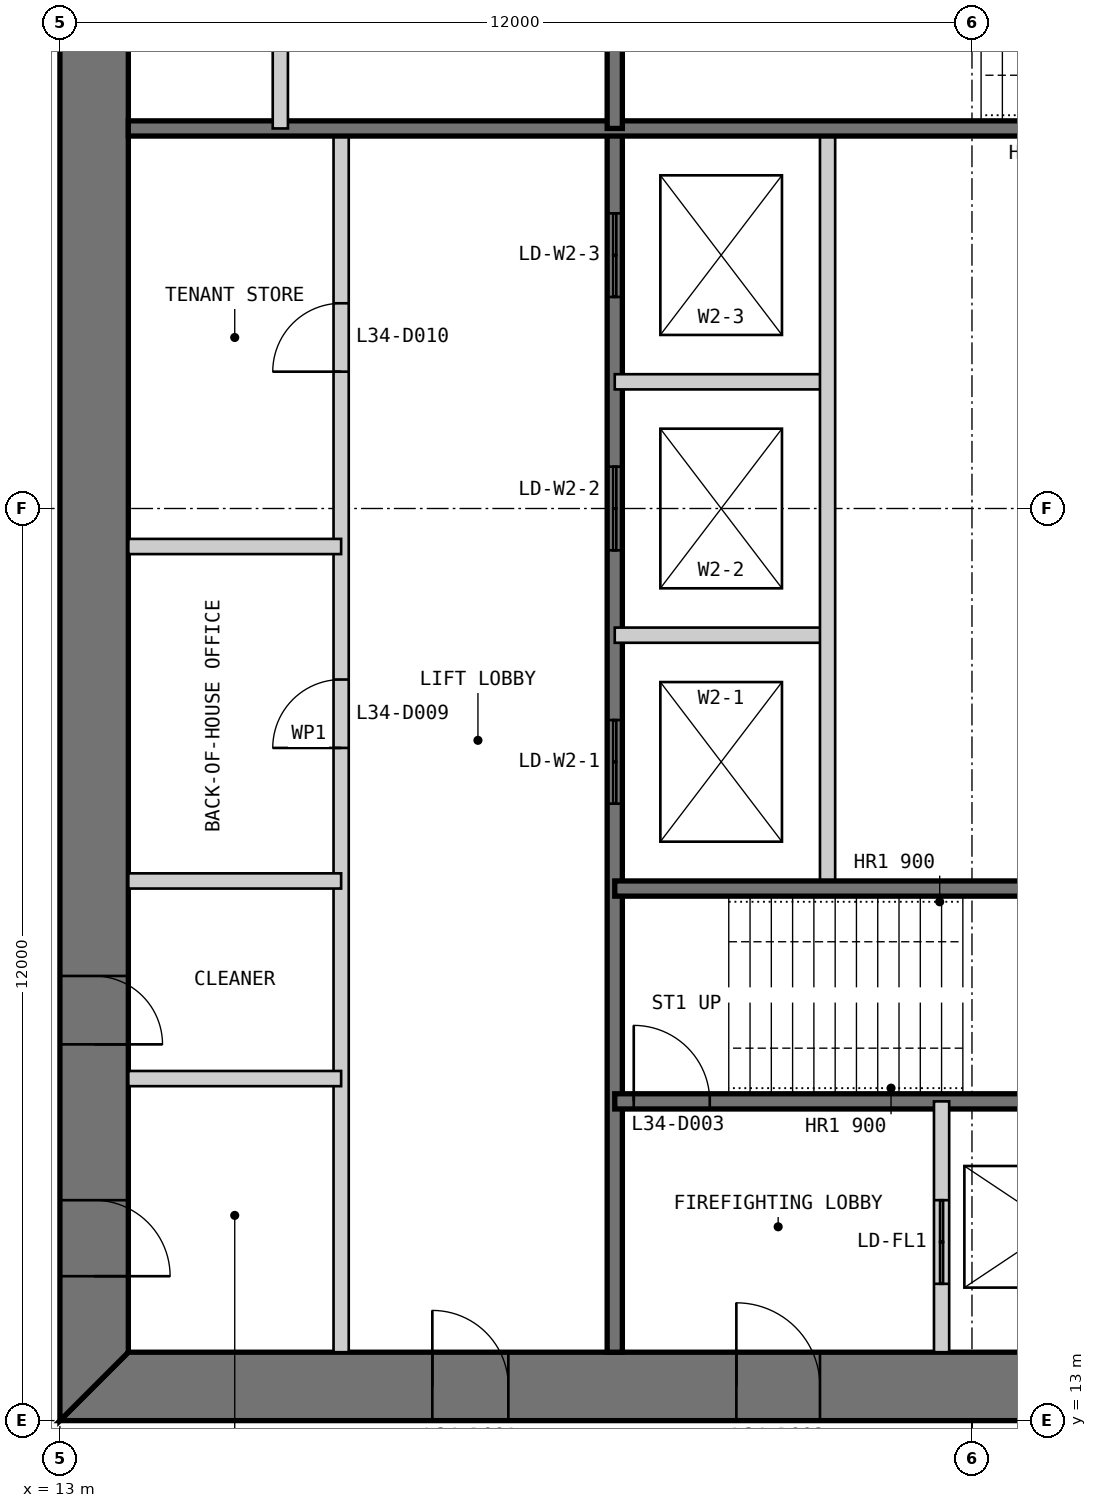
"""IFC4 building model, lengths in metres.
Left out: names, types, materials, properties, quantities, classifications, styles, units other than length and angle.
Written with IfcOpenShell. Run it as: python <this file> out.ifc"""

import sys

from ifc_helpers import new_model, si_unit, direction, frame, frame_2d, origin, place, context, subcontext, project, spatial, polyline, rectangle, outline, extrude, element, fill, save


model = new_model("IFC4")
c1 = context("Model", 3, precision=1e-05, world=origin(), true_north=direction((0.0, 1.0)))
c2 = subcontext(c1, "Body", "Model", "MODEL_VIEW")
j1 = project(units=[si_unit("LENGTHUNIT", "METRE"), si_unit("PLANEANGLEUNIT", "RADIAN")], contexts=[c1])
p1 = place(None, origin())
s1 = spatial("IfcSite", under=j1, at=p1, CompositionType="ELEMENT")
p2 = place(p1, origin())
s2 = spatial("IfcBuilding", under=s1, at=p2, CompositionType="ELEMENT")
p3 = place(p2, frame((0.0, 0.0, 146.4)))
s3 = spatial("IfcBuildingStorey", under=s2, at=p3, CompositionType="ELEMENT", Elevation=146.4)
p4 = place(p3, frame((13.0, 13.45, 0.0), z_axis=(0.0, 0.0, 1.0), x_axis=(1.0, 0.0, 0.0)))
e1 = element("IfcWall", 1, at=p4, inside=s3, PredefinedType="SHEAR", context=c2, shape_type="SweptSolid", body=[
    extrude(outline(polyline([(0.0, -0.45), (24.0, -0.45), (23.1, 0.45), (0.9, 0.45), (0.0, -0.45)])), origin(), (0.0, 0.0, 1.0), 4.0),
])
p5 = place(p4, frame((4.9, 0.0, 0.0)))
e2 = element("IfcOpeningElement", 2, at=p5, cuts=e1, PredefinedType="OPENING", context=c2, shape_type="SweptSolid", body=[
    extrude(rectangle(XDim=1.0, YDim=2.2, at=frame_2d((0.5, 1.1))), frame((0.0, 0.46, 0.0), z_axis=(0.0, -1.0, 0.0), x_axis=(1.0, 0.0, 0.0)), (0.0, 0.0, 1.0), 0.92),
])
p6 = place(p4, frame((8.9, 0.0, 0.0)))
e3 = element("IfcOpeningElement", 3, at=p6, cuts=e1, PredefinedType="OPENING", context=c2, shape_type="SweptSolid", body=[
    extrude(rectangle(XDim=1.1, YDim=2.2, at=frame_2d((0.55, 1.1))), frame((0.0, 0.46, 0.0), z_axis=(0.0, -1.0, 0.0), x_axis=(1.0, 0.0, 0.0)), (0.0, 0.0, 1.0), 0.92),
])
p7 = place(p4, frame((15.05, 0.0, 0.0)))
e4 = element("IfcOpeningElement", 4, at=p7, cuts=e1, PredefinedType="OPENING", context=c2, shape_type="SweptSolid", body=[
    extrude(rectangle(XDim=0.9, YDim=2.2, at=frame_2d((0.45, 1.1))), frame((0.0, 0.46, 0.0), z_axis=(0.0, -1.0, 0.0), x_axis=(1.0, 0.0, 0.0)), (0.0, 0.0, 1.0), 0.92),
])
p8 = place(p4, frame((17.9, 0.0, 0.0)))
e5 = element("IfcOpeningElement", 5, at=p8, cuts=e1, PredefinedType="OPENING", context=c2, shape_type="SweptSolid", body=[
    extrude(rectangle(XDim=1.0, YDim=2.2, at=frame_2d((0.5, 1.1))), frame((0.0, 0.46, 0.0), z_axis=(0.0, -1.0, 0.0), x_axis=(1.0, 0.0, 0.0)), (0.0, 0.0, 1.0), 0.92),
])
p9 = place(p4, frame((21.4, 0.0, 0.0)))
e6 = element("IfcOpeningElement", 6, at=p9, cuts=e1, PredefinedType="OPENING", context=c2, shape_type="SweptSolid", body=[
    extrude(rectangle(XDim=1.0, YDim=2.2, at=frame_2d((0.5, 1.1))), frame((0.0, 0.46, 0.0), z_axis=(0.0, -1.0, 0.0), x_axis=(1.0, 0.0, 0.0)), (0.0, 0.0, 1.0), 0.92),
])
p10 = place(p3, frame((13.45, 36.1, 0.0), z_axis=(0.0, 0.0, 1.0), x_axis=(0.0, -1.0, 0.0)))
e7 = element("IfcWall", 7, at=p10, inside=s3, PredefinedType="SHEAR", context=c2, shape_type="SweptSolid", body=[
    extrude(outline(polyline([(-0.9, -0.45), (23.1, -0.45), (22.2, 0.45), (0.0, 0.45), (-0.9, -0.45)])), origin(), (0.0, 0.0, 1.0), 4.0),
])
p11 = place(p10, frame((20.2, 0.0, 0.0)))
e8 = element("IfcOpeningElement", 8, at=p11, cuts=e7, PredefinedType="OPENING", context=c2, shape_type="SweptSolid", body=[
    extrude(rectangle(XDim=1.0, YDim=2.2, at=frame_2d((0.5, 1.1))), frame((0.0, 0.46, 0.0), z_axis=(0.0, -1.0, 0.0), x_axis=(1.0, 0.0, 0.0)), (0.0, 0.0, 1.0), 0.92),
])
p12 = place(p10, frame((17.25, 0.0, 0.0)))
e9 = element("IfcOpeningElement", 9, at=p12, cuts=e7, PredefinedType="OPENING", context=c2, shape_type="SweptSolid", body=[
    extrude(rectangle(XDim=0.9, YDim=2.2, at=frame_2d((0.45, 1.1))), frame((0.0, 0.46, 0.0), z_axis=(0.0, -1.0, 0.0), x_axis=(1.0, 0.0, 0.0)), (0.0, 0.0, 1.0), 0.92),
])
p13 = place(p3, frame((16.7, 13.9, 0.0), z_axis=(0.0, 0.0, 1.0), x_axis=(0.0, 1.0, 0.0)))
e10 = element("IfcWall", 10, at=p13, inside=s3, PredefinedType="PARTITIONING", context=c2, shape_type="SweptSolid", body=[
    extrude(rectangle(XDim=16.1, YDim=0.2, at=frame_2d((8.05, 0.0))), origin(), (0.0, 0.0, 1.0), 3.8),
])
p14 = place(p13, frame((7.95, 0.0, 0.0)))
e11 = element("IfcOpeningElement", 11, at=p14, cuts=e10, PredefinedType="OPENING", context=c2, shape_type="SweptSolid", body=[
    extrude(rectangle(XDim=0.9, YDim=2.2, at=frame_2d((0.45, 1.1))), frame((0.0, 0.11, 0.0), z_axis=(0.0, -1.0, 0.0), x_axis=(1.0, 0.0, 0.0)), (0.0, 0.0, 1.0), 0.22),
])
p15 = place(p13, frame((12.9, 0.0, 0.0)))
e12 = element("IfcOpeningElement", 12, at=p15, cuts=e10, PredefinedType="OPENING", context=c2, shape_type="SweptSolid", body=[
    extrude(rectangle(XDim=0.9, YDim=2.2, at=frame_2d((0.45, 1.1))), frame((0.0, 0.11, 0.0), z_axis=(0.0, -1.0, 0.0), x_axis=(1.0, 0.0, 0.0)), (0.0, 0.0, 1.0), 0.22),
])
p16 = place(p3, frame((20.3, 13.9, 0.0), z_axis=(0.0, 0.0, 1.0), x_axis=(0.0, 1.0, 0.0)))
e13 = element("IfcWall", 13, at=p16, inside=s3, PredefinedType="SOLIDWALL", context=c2, shape_type="SweptSolid", body=[
    extrude(rectangle(XDim=16.1, YDim=0.2, at=frame_2d((8.05, 0.0))), origin(), (0.0, 0.0, 1.0), 3.8),
])
p17 = place(p16, frame((7.217, 0.0, 0.0)))
e14 = element("IfcOpeningElement", 14, at=p17, cuts=e13, PredefinedType="OPENING", context=c2, shape_type="SweptSolid", body=[
    extrude(rectangle(XDim=1.1, YDim=2.2, at=frame_2d((0.55, 1.1))), frame((0.0, 0.11, 0.0), z_axis=(0.0, -1.0, 0.0), x_axis=(1.0, 0.0, 0.0)), (0.0, 0.0, 1.0), 0.22),
])
p18 = place(p16, frame((10.55, 0.0, 0.0)))
e15 = element("IfcOpeningElement", 15, at=p18, cuts=e13, PredefinedType="OPENING", context=c2, shape_type="SweptSolid", body=[
    extrude(rectangle(XDim=1.1, YDim=2.2, at=frame_2d((0.55, 1.1))), frame((0.0, 0.11, 0.0), z_axis=(0.0, -1.0, 0.0), x_axis=(1.0, 0.0, 0.0)), (0.0, 0.0, 1.0), 0.22),
])
p19 = place(p16, frame((13.883, 0.0, 0.0)))
e16 = element("IfcOpeningElement", 16, at=p19, cuts=e13, PredefinedType="OPENING", context=c2, shape_type="SweptSolid", body=[
    extrude(rectangle(XDim=1.1, YDim=2.2, at=frame_2d((0.55, 1.1))), frame((0.0, 0.11, 0.0), z_axis=(0.0, -1.0, 0.0), x_axis=(1.0, 0.0, 0.0)), (0.0, 0.0, 1.0), 0.22),
])
for number, where, z_axis, x_axis in (
    (17, (20.3, 23.333, 0.0), (0.0, 0.0, 1.0), (1.0, 0.0, 0.0)),
    (18, (20.3, 26.667, 0.0), (0.0, 0.0, 1.0), (1.0, 0.0, 0.0)),
):
    element("IfcWall", number, at=place(p3, frame(where, z_axis=z_axis, x_axis=x_axis)), inside=s3, PredefinedType="PARTITIONING", context=c2, shape_type="SweptSolid", body=[
        extrude(rectangle(XDim=2.8, YDim=0.2, at=frame_2d((1.4, 0.0))), origin(), (0.0, 0.0, 1.0), 3.8),
    ])
p20 = place(p3, frame((23.1, 20.0, 0.0), z_axis=(0.0, 0.0, 1.0), x_axis=(0.0, 1.0, 0.0)))
e19 = element("IfcWall", 19, at=p20, inside=s3, PredefinedType="PARTITIONING", context=c2, shape_type="SweptSolid", body=[
    extrude(rectangle(XDim=10.0, YDim=0.2, at=frame_2d((5.0, 0.0))), origin(), (0.0, 0.0, 1.0), 3.8),
])
p21 = place(p3, frame((20.3, 17.2, 0.0), z_axis=(0.0, 0.0, 1.0), x_axis=(1.0, 0.0, 0.0)))
e20 = element("IfcWall", 20, at=p21, inside=s3, PredefinedType="SOLIDWALL", context=c2, shape_type="SweptSolid", body=[
    extrude(rectangle(XDim=9.4, YDim=0.2, at=frame_2d((4.7, 0.0))), origin(), (0.0, 0.0, 1.0), 3.8),
])
p22 = place(p21, frame((0.25, 0.0, 0.0)))
e21 = element("IfcOpeningElement", 21, at=p22, cuts=e20, PredefinedType="OPENING", context=c2, shape_type="SweptSolid", body=[
    extrude(rectangle(XDim=1.0, YDim=2.2, at=frame_2d((0.5, 1.1))), frame((0.0, 0.11, 0.0), z_axis=(0.0, -1.0, 0.0), x_axis=(1.0, 0.0, 0.0)), (0.0, 0.0, 1.0), 0.22),
])
p23 = place(p3, frame((20.3, 20.0, 0.0), z_axis=(0.0, 0.0, 1.0), x_axis=(1.0, 0.0, 0.0)))
e22 = element("IfcWall", 22, at=p23, inside=s3, PredefinedType="SOLIDWALL", context=c2, shape_type="SweptSolid", body=[
    extrude(rectangle(XDim=15.8, YDim=0.2, at=frame_2d((7.9, 0.0))), origin(), (0.0, 0.0, 1.0), 3.8),
])
p24 = place(p3, frame((24.6, 13.9, 0.0), z_axis=(0.0, 0.0, 1.0), x_axis=(0.0, 1.0, 0.0)))
e23 = element("IfcWall", 23, at=p24, inside=s3, PredefinedType="PARTITIONING", context=c2, shape_type="SweptSolid", body=[
    extrude(rectangle(XDim=3.3, YDim=0.2, at=frame_2d((1.65, 0.0))), origin(), (0.0, 0.0, 1.0), 3.8),
])
p25 = place(p24, frame((0.9, 0.0, 0.0)))
e24 = element("IfcOpeningElement", 24, at=p25, cuts=e23, PredefinedType="OPENING", context=c2, shape_type="SweptSolid", body=[
    extrude(rectangle(XDim=1.1, YDim=2.2, at=frame_2d((0.55, 1.1))), frame((0.0, 0.11, 0.0), z_axis=(0.0, -1.0, 0.0), x_axis=(1.0, 0.0, 0.0)), (0.0, 0.0, 1.0), 0.22),
])
for number, where, z_axis, x_axis in (
    (25, (13.9, 17.5, 0.0), (0.0, 0.0, 1.0), (1.0, 0.0, 0.0)),
    (26, (13.9, 20.1, 0.0), (0.0, 0.0, 1.0), (1.0, 0.0, 0.0)),
    (27, (13.9, 24.5, 0.0), (0.0, 0.0, 1.0), (1.0, 0.0, 0.0)),
):
    element("IfcWall", number, at=place(p3, frame(where, z_axis=z_axis, x_axis=x_axis)), inside=s3, PredefinedType="PARTITIONING", context=c2, shape_type="SweptSolid", body=[
        extrude(rectangle(XDim=2.8, YDim=0.2, at=frame_2d((1.4, 0.0))), origin(), (0.0, 0.0, 1.0), 3.8),
    ])
p26 = place(p3, frame((29.7, 30.0, 0.0), z_axis=(0.0, 0.0, 1.0), x_axis=(-1.0, 0.0, 0.0)))
e28 = element("IfcWall", 28, at=p26, inside=s3, PredefinedType="SOLIDWALL", context=c2, shape_type="SweptSolid", body=[
    extrude(rectangle(XDim=15.8, YDim=0.2, at=frame_2d((7.9, 0.0))), origin(), (0.0, 0.0, 1.0), 3.8),
])
p27 = place(p3, frame((20.3, 36.1, 0.0), z_axis=(0.0, 0.0, 1.0), x_axis=(0.0, -1.0, 0.0)))
e29 = element("IfcWall", 29, at=p27, inside=s3, PredefinedType="SOLIDWALL", context=c2, shape_type="SweptSolid", body=[
    extrude(rectangle(XDim=6.1, YDim=0.2, at=frame_2d((3.05, 0.0))), origin(), (0.0, 0.0, 1.0), 3.8),
])
p28 = place(p3, frame((15.9, 36.1, 0.0), z_axis=(0.0, 0.0, 1.0), x_axis=(0.0, -1.0, 0.0)))
e30 = element("IfcWall", 30, at=p28, inside=s3, PredefinedType="PARTITIONING", context=c2, shape_type="SweptSolid", body=[
    extrude(rectangle(XDim=6.1, YDim=0.2, at=frame_2d((3.05, 0.0))), origin(), (0.0, 0.0, 1.0), 3.8),
])
p29 = place(p5, origin())
e31 = element("IfcDoor", 31, at=p29, inside=s3, OperationType="SINGLE_SWING_LEFT", PredefinedType="DOOR", context=c2, shape_type="SweptSolid", body=[
    extrude(rectangle(XDim=1.0, YDim=2.2, at=frame_2d((0.5, 1.1))), frame((0.0, 0.025, 0.0), z_axis=(0.0, -1.0, 0.0), x_axis=(1.0, 0.0, 0.0)), (0.0, 0.0, 1.0), 0.05),
    extrude(outline(polyline([(0.0, 0.0), (0.04, 0.0), (0.04, 2.16), (0.96, 2.16), (0.96, 0.0), (1.0, 0.0), (1.0, 2.2), (0.0, 2.2), (0.0, 0.0)])), frame((0.0, 0.3, 0.0), z_axis=(0.0, -1.0, 0.0), x_axis=(1.0, 0.0, 0.0)), (0.0, 0.0, 1.0), 0.6),
])
fill(e2, e31)
p30 = place(p6, origin())
e32 = element("IfcDoor", 32, at=p30, inside=s3, OperationType="SINGLE_SWING_LEFT", PredefinedType="DOOR", context=c2, shape_type="SweptSolid", body=[
    extrude(rectangle(XDim=1.1, YDim=2.2, at=frame_2d((0.55, 1.1))), frame((0.0, 0.025, 0.0), z_axis=(0.0, -1.0, 0.0), x_axis=(1.0, 0.0, 0.0)), (0.0, 0.0, 1.0), 0.05),
    extrude(outline(polyline([(0.0, 0.0), (0.04, 0.0), (0.04, 2.16), (1.06, 2.16), (1.06, 0.0), (1.1, 0.0), (1.1, 2.2), (0.0, 2.2), (0.0, 0.0)])), frame((0.0, 0.3, 0.0), z_axis=(0.0, -1.0, 0.0), x_axis=(1.0, 0.0, 0.0)), (0.0, 0.0, 1.0), 0.6),
])
fill(e3, e32)
p31 = place(p22, origin())
e33 = element("IfcDoor", 33, at=p31, inside=s3, OperationType="SINGLE_SWING_LEFT", PredefinedType="DOOR", context=c2, shape_type="SweptSolid", body=[
    extrude(rectangle(XDim=1.0, YDim=2.2, at=frame_2d((0.5, 1.1))), frame((0.0, 0.025, 0.0), z_axis=(0.0, -1.0, 0.0), x_axis=(1.0, 0.0, 0.0)), (0.0, 0.0, 1.0), 0.05),
])
fill(e21, e33)
p32 = place(p11, origin())
e34 = element("IfcDoor", 34, at=p32, inside=s3, OperationType="SINGLE_SWING_RIGHT", PredefinedType="DOOR", context=c2, shape_type="SweptSolid", body=[
    extrude(rectangle(XDim=1.0, YDim=2.2, at=frame_2d((0.5, 1.1))), frame((0.0, 0.025, 0.0), z_axis=(0.0, -1.0, 0.0), x_axis=(1.0, 0.0, 0.0)), (0.0, 0.0, 1.0), 0.05),
    extrude(outline(polyline([(0.0, 0.0), (0.04, 0.0), (0.04, 2.16), (0.96, 2.16), (0.96, 0.0), (1.0, 0.0), (1.0, 2.2), (0.0, 2.2), (0.0, 0.0)])), frame((0.0, 0.3, 0.0), z_axis=(0.0, -1.0, 0.0), x_axis=(1.0, 0.0, 0.0)), (0.0, 0.0, 1.0), 0.6),
])
fill(e8, e34)
p33 = place(p12, origin())
e35 = element("IfcDoor", 35, at=p33, inside=s3, OperationType="SINGLE_SWING_RIGHT", PredefinedType="DOOR", context=c2, shape_type="SweptSolid", body=[
    extrude(rectangle(XDim=0.9, YDim=2.2, at=frame_2d((0.45, 1.1))), frame((0.0, 0.025, 0.0), z_axis=(0.0, -1.0, 0.0), x_axis=(1.0, 0.0, 0.0)), (0.0, 0.0, 1.0), 0.05),
    extrude(outline(polyline([(0.0, 0.0), (0.04, 0.0), (0.04, 2.16), (0.86, 2.16), (0.86, 0.0), (0.9, 0.0), (0.9, 2.2), (0.0, 2.2), (0.0, 0.0)])), frame((0.0, 0.3, 0.0), z_axis=(0.0, -1.0, 0.0), x_axis=(1.0, 0.0, 0.0)), (0.0, 0.0, 1.0), 0.6),
])
fill(e9, e35)
p34 = place(p14, origin())
e36 = element("IfcDoor", 36, at=p34, inside=s3, OperationType="SINGLE_SWING_LEFT", PredefinedType="DOOR", context=c2, shape_type="SweptSolid", body=[
    extrude(rectangle(XDim=0.9, YDim=2.2, at=frame_2d((0.45, 1.1))), frame((0.0, 0.025, 0.0), z_axis=(0.0, -1.0, 0.0), x_axis=(1.0, 0.0, 0.0)), (0.0, 0.0, 1.0), 0.05),
])
fill(e11, e36)
p35 = place(p15, origin())
e37 = element("IfcDoor", 37, at=p35, inside=s3, OperationType="SINGLE_SWING_LEFT", PredefinedType="DOOR", context=c2, shape_type="SweptSolid", body=[
    extrude(rectangle(XDim=0.9, YDim=2.2, at=frame_2d((0.45, 1.1))), frame((0.0, 0.025, 0.0), z_axis=(0.0, -1.0, 0.0), x_axis=(1.0, 0.0, 0.0)), (0.0, 0.0, 1.0), 0.05),
])
fill(e12, e37)
p36 = place(p25, origin())
e38 = element("IfcDoor", 38, at=p36, inside=s3, OperationType="DOUBLE_DOOR_SLIDING", PredefinedType="DOOR", context=c2, shape_type="SweptSolid", body=[
    extrude(rectangle(XDim=1.1, YDim=2.2, at=frame_2d((0.55, 1.1))), frame((0.0, 0.025, 0.0), z_axis=(0.0, -1.0, 0.0), x_axis=(1.0, 0.0, 0.0)), (0.0, 0.0, 1.0), 0.05),
])
fill(e24, e38)
p37 = place(p17, origin())
e39 = element("IfcDoor", 39, at=p37, inside=s3, OperationType="DOUBLE_DOOR_SLIDING", PredefinedType="DOOR", context=c2, shape_type="SweptSolid", body=[
    extrude(rectangle(XDim=1.1, YDim=2.2, at=frame_2d((0.55, 1.1))), frame((0.0, 0.025, 0.0), z_axis=(0.0, -1.0, 0.0), x_axis=(1.0, 0.0, 0.0)), (0.0, 0.0, 1.0), 0.05),
])
fill(e14, e39)
p38 = place(p18, origin())
e40 = element("IfcDoor", 40, at=p38, inside=s3, OperationType="DOUBLE_DOOR_SLIDING", PredefinedType="DOOR", context=c2, shape_type="SweptSolid", body=[
    extrude(rectangle(XDim=1.1, YDim=2.2, at=frame_2d((0.55, 1.1))), frame((0.0, 0.025, 0.0), z_axis=(0.0, -1.0, 0.0), x_axis=(1.0, 0.0, 0.0)), (0.0, 0.0, 1.0), 0.05),
])
fill(e15, e40)
p39 = place(p19, origin())
e41 = element("IfcDoor", 41, at=p39, inside=s3, OperationType="DOUBLE_DOOR_SLIDING", PredefinedType="DOOR", context=c2, shape_type="SweptSolid", body=[
    extrude(rectangle(XDim=1.1, YDim=2.2, at=frame_2d((0.55, 1.1))), frame((0.0, 0.025, 0.0), z_axis=(0.0, -1.0, 0.0), x_axis=(1.0, 0.0, 0.0)), (0.0, 0.0, 1.0), 0.05),
])
fill(e16, e41)
save(model, sys.argv[1])
